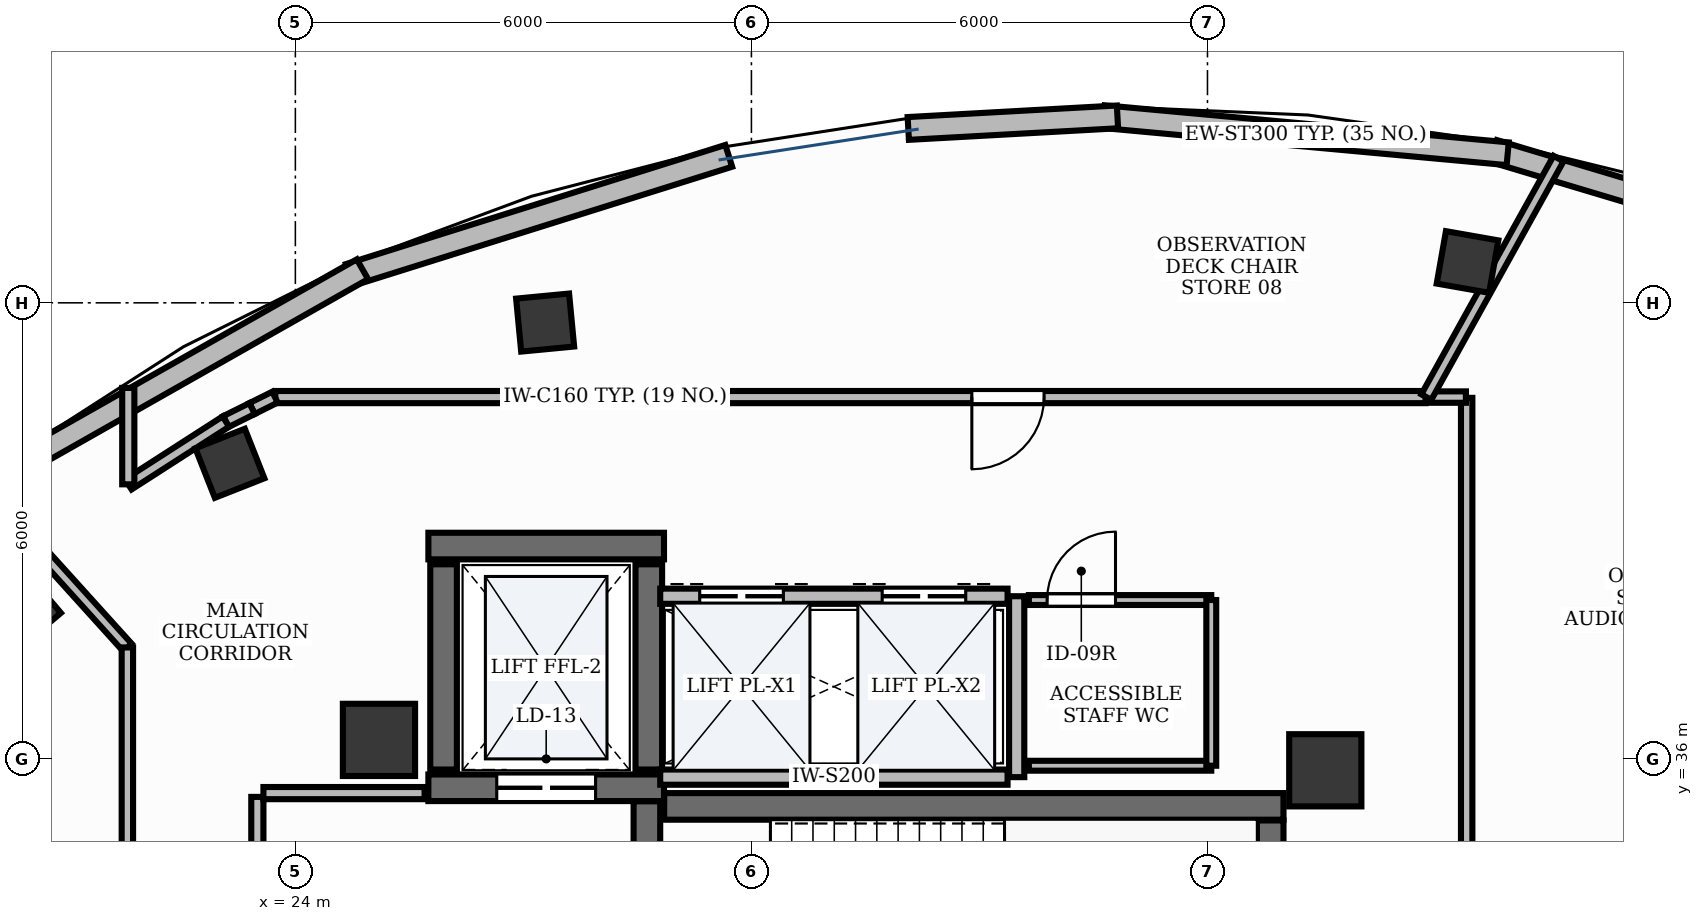
"""IFC4 building model, lengths in metres.
Left out: names, types, materials, properties, quantities, classifications, styles, units other than length and angle.
Written with IfcOpenShell. Run it as: python <this file> out.ifc"""

import sys

from ifc_helpers import new_model, si_unit, direction, frame, frame_2d, origin, origin_2d, place, context, subcontext, project, spatial, rectangle, extrude, element, fill, save


model = new_model("IFC4")
c1 = context("Model", 3, precision=1e-05, world=origin(), true_north=direction((0.0, 1.0)))
c2 = subcontext(c1, "Body", "Model", "MODEL_VIEW")
j1 = project(units=[si_unit("LENGTHUNIT", "METRE"), si_unit("PLANEANGLEUNIT", "RADIAN")], contexts=[c1])
p1 = place(None, origin())
s1 = spatial("IfcSite", under=j1, at=p1, CompositionType="ELEMENT")
p2 = place(p1, origin())
s2 = spatial("IfcBuilding", under=s1, at=p2, CompositionType="ELEMENT")
p3 = place(p2, frame((0.0, 0.0, 318.6)))
s3 = spatial("IfcBuildingStorey", under=s2, at=p3, CompositionType="ELEMENT", Elevation=318.6)
p4 = place(p3, frame((28.852, 35.375, 0.0), z_axis=(0.0, 0.0, 1.0), x_axis=(1.0, 0.0, 0.0)))
e1 = element("IfcWall", 1, at=p4, inside=s3, PredefinedType="SHEAR", context=c2, shape_type="SweptSolid", body=[
    extrude(rectangle(XDim=8.148, YDim=0.35, at=frame_2d((4.074, 0.0))), origin(), (0.0, 0.0, 1.0), 3.79),
])
p5 = place(p3, frame((36.825, 32.11, 0.0), z_axis=(0.0, 0.0, 1.0), x_axis=(0.0, 1.0, 0.0)))
e2 = element("IfcWall", 2, at=p5, inside=s3, PredefinedType="SHEAR", context=c2, shape_type="SweptSolid", body=[
    extrude(rectangle(XDim=3.08, YDim=0.35, at=frame_2d((1.54, 0.0))), origin(), (0.0, 0.0, 1.0), 3.79),
])
p6 = place(p3, frame((28.625, 32.11, 0.0), z_axis=(0.0, 0.0, 1.0), x_axis=(0.0, 1.0, 0.0)))
e3 = element("IfcWall", 3, at=p6, inside=s3, PredefinedType="SHEAR", context=c2, shape_type="SweptSolid", body=[
    extrude(rectangle(XDim=3.333, YDim=0.35, at=frame_2d((1.667, 0.0))), origin(), (0.0, 0.0, 1.0), 3.79),
])
p7 = place(p6, frame((0.2, 0.0, 0.0)))
e4 = element("IfcOpeningElement", 4, at=p7, cuts=e3, PredefinedType="OPENING", context=c2, shape_type="SweptSolid", body=[
    extrude(rectangle(XDim=1.05, YDim=2.15, at=frame_2d((0.525, 1.075))), frame((0.0, 0.19, 0.0), z_axis=(0.0, -1.0, 0.0), x_axis=(1.0, 0.0, 0.0)), (0.0, 0.0, 1.0), 0.38),
])
p8 = place(p3, frame((25.75, 38.8, 0.0), z_axis=(0.0, 0.0, 1.0), x_axis=(1.0, 0.0, 0.0)))
e5 = element("IfcWall", 5, at=p8, inside=s3, PredefinedType="SHEAR", context=c2, shape_type="SweptSolid", body=[
    extrude(rectangle(XDim=3.1, YDim=0.35, at=frame_2d((1.55, 0.0))), origin(), (0.0, 0.0, 1.0), 3.79),
])
p9 = place(p3, frame((25.75, 35.62, 0.0), z_axis=(0.0, 0.0, 1.0), x_axis=(1.0, 0.0, 0.0)))
e6 = element("IfcWall", 6, at=p9, inside=s3, PredefinedType="SHEAR", context=c2, shape_type="SweptSolid", body=[
    extrude(rectangle(XDim=3.1, YDim=0.35, at=frame_2d((1.55, 0.0))), origin(), (0.0, 0.0, 1.0), 3.79),
])
p10 = place(p9, frame((0.9, 0.0, 0.0)))
e7 = element("IfcOpeningElement", 7, at=p10, cuts=e6, PredefinedType="OPENING", context=c2, shape_type="SweptSolid", body=[
    extrude(rectangle(XDim=1.3, YDim=2.2, at=frame_2d((0.65, 1.1))), frame((0.0, 0.19, 0.0), z_axis=(0.0, -1.0, 0.0), x_axis=(1.0, 0.0, 0.0)), (0.0, 0.0, 1.0), 0.38),
])
for number, where, z_axis, x_axis in (
    (8, (25.95, 35.86, 0.0), (0.0, 0.0, 1.0), (0.0, 1.0, 0.0)),
    (9, (28.65, 35.86, 0.0), (0.0, 0.0, 1.0), (0.0, 1.0, 0.0)),
):
    element("IfcWall", number, at=place(p3, frame(where, z_axis=z_axis, x_axis=x_axis)), inside=s3, PredefinedType="SHEAR", context=c2, shape_type="SweptSolid", body=[
        extrude(rectangle(XDim=2.7, YDim=0.35, at=frame_2d((1.35, 0.0))), origin(), (0.0, 0.0, 1.0), 3.79),
    ])
for number, where, z_axis, x_axis in (
    (10, (37.55, 35.85, -0.0), (0.0, 0.0, 1.0), (1.0, 0.0, 0.0)),
    (11, (25.1, 36.25, -0.0), (0.0, 0.0, 1.0), (1.0, 0.0, 0.0)),
):
    element("IfcColumn", number, at=place(p3, frame(where, z_axis=z_axis, x_axis=x_axis)), inside=s3, PredefinedType="PILASTER", context=c2, shape_type="SweptSolid", body=[
        extrude(rectangle(XDim=0.95, YDim=0.95, at=origin_2d()), origin(), (0.0, 0.0, 1.0), 3.791),
    ])
for number, where, z_axis, x_axis in (
    (12, (39.421, 42.537, -0.0), (0.0, 0.0, 1.0), (-0.985, 0.173, 0.0)),
    (13, (27.286, 41.74, -0.0), (0.0, 0.0, 1.0), (0.995, 0.095, 0.0)),
    (14, (23.138, 39.889, -0.0), (0.0, 0.0, 1.0), (0.93, 0.367, 0.0)),
    (15, (20.422, 37.962, -0.0), (0.0, 0.0, 1.0), (0.764, 0.645, 0.0)),
):
    element("IfcColumn", number, at=place(p3, frame(where, z_axis=z_axis, x_axis=x_axis)), inside=s3, PredefinedType="COLUMN", context=c2, shape_type="SweptSolid", body=[
        extrude(rectangle(XDim=0.7, YDim=0.7, at=origin_2d()), origin(), (0.0, 0.0, 1.0), 3.791),
    ])
p11 = place(p3, frame((44.787, 42.493, 0.0), z_axis=(0.0, 0.0, 1.0), x_axis=(-0.957960798093, 0.286899127423, 0.0)))
e16 = element("IfcWall", 16, at=p11, inside=s3, PredefinedType="STANDARD", context=c2, shape_type="SweptSolid", body=[
    extrude(rectangle(XDim=5.241, YDim=0.3, at=frame_2d((2.621, 0.0))), origin(), (0.0, 0.0, 1.0), 3.79),
])
p12 = place(p3, frame((39.95, 43.961, 0.0), z_axis=(0.0, 0.0, 1.0), x_axis=(-0.995809155395, 0.091455595959, 0.0)))
e17 = element("IfcWall", 17, at=p12, inside=s3, PredefinedType="STANDARD", context=c2, shape_type="SweptSolid", body=[
    extrude(rectangle(XDim=5.336, YDim=0.3, at=frame_2d((2.668, 0.0))), origin(), (0.0, 0.0, 1.0), 3.79),
])
p13 = place(p3, frame((34.816, 44.446, 0.0), z_axis=(0.0, 0.0, 1.0), x_axis=(-0.99847639055, -0.055180590022, 0.0)))
e18 = element("IfcWall", 18, at=p13, inside=s3, PredefinedType="STANDARD", context=c2, shape_type="SweptSolid", body=[
    extrude(rectangle(XDim=2.756, YDim=0.3, at=frame_2d((1.378, 0.0))), origin(), (0.0, 0.0, 1.0), 3.79),
])
p14 = place(p3, frame((29.702, 43.934, 0.0), z_axis=(0.0, 0.0, 1.0), x_axis=(-0.954089764454, -0.299520819584, 0.0)))
e19 = element("IfcWall", 19, at=p14, inside=s3, PredefinedType="STANDARD", context=c2, shape_type="SweptSolid", body=[
    extrude(rectangle(XDim=5.232, YDim=0.3, at=frame_2d((2.616, 0.0))), origin(), (0.0, 0.0, 1.0), 3.79),
])
p15 = place(p3, frame((24.883, 42.442, 0.0), z_axis=(0.0, 0.0, 1.0), x_axis=(-0.869895003659, -0.493236943679, 0.0)))
e20 = element("IfcWall", 20, at=p15, inside=s3, PredefinedType="STANDARD", context=c2, shape_type="SweptSolid", body=[
    extrude(rectangle(XDim=5.051, YDim=0.3, at=frame_2d((2.526, 0.0))), origin(), (0.0, 0.0, 1.0), 3.79),
])
p16 = place(p3, frame((33.49, 35.76, 0.0), z_axis=(0.0, 0.0, 1.0), x_axis=(0.0, 1.0, 0.0)))
e21 = element("IfcWall", 21, at=p16, inside=s3, PredefinedType="PARTITIONING", context=c2, shape_type="SweptSolid", body=[
    extrude(rectangle(XDim=2.38, YDim=0.2, at=frame_2d((1.19, 0.0))), origin(), (0.0, 0.0, 1.0), 2.8),
])
p17 = place(p3, frame((28.8, 35.76, 0.0), z_axis=(0.0, 0.0, 1.0), x_axis=(1.0, 0.0, 0.0)))
e22 = element("IfcWall", 22, at=p17, inside=s3, PredefinedType="PARTITIONING", context=c2, shape_type="SweptSolid", body=[
    extrude(rectangle(XDim=4.57, YDim=0.2, at=frame_2d((2.285, 0.0))), origin(), (0.0, 0.0, 1.0), 2.8),
])
p18 = place(p3, frame((28.8, 38.14, 0.0), z_axis=(0.0, 0.0, 1.0), x_axis=(1.0, 0.0, 0.0)))
e23 = element("IfcWall", 23, at=p18, inside=s3, PredefinedType="PARTITIONING", context=c2, shape_type="SweptSolid", body=[
    extrude(rectangle(XDim=4.57, YDim=0.2, at=frame_2d((2.285, 0.0))), origin(), (0.0, 0.0, 1.0), 2.8),
])
p19 = place(p18, frame((0.52, 0.0, 0.0)))
e24 = element("IfcOpeningElement", 24, at=p19, cuts=e23, PredefinedType="OPENING", context=c2, shape_type="SweptSolid", body=[
    extrude(rectangle(XDim=1.1, YDim=2.2, at=frame_2d((0.55, 1.1))), frame((0.0, 0.115, 0.0), z_axis=(0.0, -1.0, 0.0), x_axis=(1.0, 0.0, 0.0)), (0.0, 0.0, 1.0), 0.23),
])
p20 = place(p18, frame((2.92, 0.0, 0.0)))
e25 = element("IfcOpeningElement", 25, at=p20, cuts=e23, PredefinedType="OPENING", context=c2, shape_type="SweptSolid", body=[
    extrude(rectangle(XDim=1.1, YDim=2.2, at=frame_2d((0.55, 1.1))), frame((0.0, 0.115, 0.0), z_axis=(0.0, -1.0, 0.0), x_axis=(1.0, 0.0, 0.0)), (0.0, 0.0, 1.0), 0.23),
])
p21 = place(p3, frame((23.5, 32.1, 0.0), z_axis=(0.0, 0.0, 1.0), x_axis=(0.0, 1.0, 0.0)))
e26 = element("IfcWall", 26, at=p21, inside=s3, PredefinedType="PARTITIONING", context=c2, shape_type="SweptSolid", body=[
    extrude(rectangle(XDim=3.4, YDim=0.16, at=frame_2d((1.7, 0.0))), origin(), (0.0, 0.0, 1.0), 2.8),
])
p22 = place(p21, frame((1.175, 0.0, 0.0)))
e27 = element("IfcOpeningElement", 27, at=p22, cuts=e26, PredefinedType="OPENING", context=c2, shape_type="SweptSolid", body=[
    extrude(rectangle(XDim=1.05, YDim=2.15, at=frame_2d((0.525, 1.075))), frame((0.0, 0.095, 0.0), z_axis=(0.0, -1.0, 0.0), x_axis=(1.0, 0.0, 0.0)), (0.0, 0.0, 1.0), 0.19),
])
p23 = place(p3, frame((23.58, 35.55, 0.0), z_axis=(0.0, 0.0, 1.0), x_axis=(1.0, 0.0, 0.0)))
e28 = element("IfcWall", 28, at=p23, inside=s3, PredefinedType="PARTITIONING", context=c2, shape_type="SweptSolid", body=[
    extrude(rectangle(XDim=2.12, YDim=0.16, at=frame_2d((1.06, 0.0))), origin(), (0.0, 0.0, 1.0), 2.8),
])
p24 = place(p3, frame((33.65, 38.09, 0.0), z_axis=(0.0, 0.0, 1.0), x_axis=(1.0, 0.0, 0.0)))
e29 = element("IfcWall", 29, at=p24, inside=s3, PredefinedType="PARTITIONING", context=c2, shape_type="SweptSolid", body=[
    extrude(rectangle(XDim=2.4, YDim=0.13, at=frame_2d((1.2, 0.0))), origin(), (0.0, 0.0, 1.0), 2.8),
])
p25 = place(p24, frame((0.24, 0.0, 0.0)))
e30 = element("IfcOpeningElement", 30, at=p25, cuts=e29, PredefinedType="OPENING", context=c2, shape_type="SweptSolid", body=[
    extrude(rectangle(XDim=0.9, YDim=2.15, at=frame_2d((0.45, 1.075))), frame((0.0, 0.08, 0.0), z_axis=(0.0, -1.0, 0.0), x_axis=(1.0, 0.0, 0.0)), (0.0, 0.0, 1.0), 0.16),
])
p26 = place(p3, frame((39.41, 30.053, 0.0), z_axis=(0.0, 0.0, 1.0), x_axis=(0.0, 1.0, 0.0)))
e31 = element("IfcWall", 31, at=p26, inside=s3, PredefinedType="PARTITIONING", context=c2, shape_type="SweptSolid", body=[
    extrude(rectangle(XDim=10.697, YDim=0.15, at=frame_2d((5.349, 0.0))), origin(), (0.0, 0.0, 1.0), 2.8),
])
p27 = place(p26, frame((0.571, 0.0, 0.0)))
e32 = element("IfcOpeningElement", 32, at=p27, cuts=e31, PredefinedType="OPENING", context=c2, shape_type="SweptSolid", body=[
    extrude(rectangle(XDim=0.95, YDim=2.15, at=frame_2d((0.475, 1.075))), frame((0.0, 0.09, 0.0), z_axis=(0.0, -1.0, 0.0), x_axis=(1.0, 0.0, 0.0)), (0.0, 0.0, 1.0), 0.18),
])
p28 = place(p3, frame((38.869, 40.76, 0.0), z_axis=(0.0, 0.0, 1.0), x_axis=(-1.0, 0.0, 0.0)))
e33 = element("IfcWall", 33, at=p28, inside=s3, PredefinedType="PARTITIONING", context=c2, shape_type="SweptSolid", body=[
    extrude(rectangle(XDim=15.133, YDim=0.16, at=frame_2d((7.566, 0.0))), origin(), (0.0, 0.0, 1.0), 2.8),
])
p29 = place(p28, frame((5.019, 0.0, 0.0)))
e34 = element("IfcOpeningElement", 34, at=p29, cuts=e33, PredefinedType="OPENING", context=c2, shape_type="SweptSolid", body=[
    extrude(rectangle(XDim=0.95, YDim=2.15, at=frame_2d((0.475, 1.075))), frame((0.0, 0.095, 0.0), z_axis=(0.0, -1.0, 0.0), x_axis=(1.0, 0.0, 0.0)), (0.0, 0.0, 1.0), 0.19),
])
p30 = place(p3, frame((36.05, 35.91, 0.0), z_axis=(0.0, 0.0, 1.0), x_axis=(-1.0, 0.0, 0.0)))
e35 = element("IfcWall", 35, at=p30, inside=s3, PredefinedType="PARTITIONING", context=c2, shape_type="SweptSolid", body=[
    extrude(rectangle(XDim=2.4, YDim=0.13, at=frame_2d((1.2, 0.0))), origin(), (0.0, 0.0, 1.0), 2.8),
])
p31 = place(p3, frame((36.05, 38.09, 0.0), z_axis=(0.0, 0.0, 1.0), x_axis=(0.0, -1.0, 0.0)))
e36 = element("IfcWall", 36, at=p31, inside=s3, PredefinedType="PARTITIONING", context=c2, shape_type="SweptSolid", body=[
    extrude(rectangle(XDim=2.18, YDim=0.13, at=frame_2d((1.09, 0.0))), origin(), (0.0, 0.0, 1.0), 2.8),
])
p32 = place(p3, frame((39.4, 40.76, 0.0), z_axis=(0.0, 0.0, 1.0), x_axis=(-1.0, 0.0, 0.0)))
e37 = element("IfcWall", 37, at=p32, inside=s3, PredefinedType="PARTITIONING", context=c2, shape_type="SweptSolid", body=[
    extrude(rectangle(XDim=0.521, YDim=0.15, at=frame_2d((0.26, 0.0))), origin(), (0.0, 0.0, 1.0), 2.8),
])
p33 = place(p3, frame((38.879, 40.76, 0.0), z_axis=(0.0, 0.0, 1.0), x_axis=(0.484787461139, 0.874631989766, 0.0)))
e38 = element("IfcWall", 38, at=p33, inside=s3, PredefinedType="PARTITIONING", context=c2, shape_type="SweptSolid", body=[
    extrude(rectangle(XDim=3.587, YDim=0.15, at=frame_2d((1.793, 0.0))), origin(), (0.0, 0.0, 1.0), 2.8),
])
p34 = place(p3, frame((23.732, 40.759, 0.0), z_axis=(0.0, 0.0, 1.0), x_axis=(-0.895294719733, -0.445474314431, 0.0)))
e39 = element("IfcWall", 39, at=p34, inside=s3, PredefinedType="PARTITIONING", context=c2, shape_type="SweptSolid", body=[
    extrude(rectangle(XDim=0.337, YDim=0.16, at=frame_2d((0.168, 0.0))), origin(), (0.0, 0.0, 1.0), 2.8),
])
p35 = place(p3, frame((23.43, 40.609, 0.0), z_axis=(0.0, 0.0, 1.0), x_axis=(-0.895442423971, -0.445177341463, 0.0)))
e40 = element("IfcWall", 40, at=p35, inside=s3, PredefinedType="PARTITIONING", context=c2, shape_type="SweptSolid", body=[
    extrude(rectangle(XDim=0.384, YDim=0.16, at=frame_2d((0.192, 0.0))), origin(), (0.0, 0.0, 1.0), 2.8),
])
p36 = place(p3, frame((23.086, 40.438, 0.0), z_axis=(0.0, 0.0, 1.0), x_axis=(-0.841116099264, -0.540854608522, 0.0)))
e41 = element("IfcWall", 41, at=p36, inside=s3, PredefinedType="PARTITIONING", context=c2, shape_type="SweptSolid", body=[
    extrude(rectangle(XDim=1.526, YDim=0.16, at=frame_2d((0.763, 0.0))), origin(), (0.0, 0.0, 1.0), 2.8),
])
p37 = place(p3, frame((21.802, 39.612, 0.0), z_axis=(0.0, 0.0, 1.0), x_axis=(0.0, 1.0, 0.0)))
e42 = element("IfcWall", 42, at=p37, inside=s3, PredefinedType="PARTITIONING", context=c2, shape_type="SweptSolid", body=[
    extrude(rectangle(XDim=1.269, YDim=0.16, at=frame_2d((0.634, 0.0))), origin(), (0.0, 0.0, 1.0), 2.8),
])
p38 = place(p3, frame((19.877, 39.583, 0.0), z_axis=(0.0, 0.0, 1.0), x_axis=(0.670438239368, -0.741965340965, 0.0)))
e43 = element("IfcWall", 43, at=p38, inside=s3, PredefinedType="PARTITIONING", context=c2, shape_type="SweptSolid", body=[
    extrude(rectangle(XDim=2.854, YDim=0.15, at=frame_2d((1.427, 0.0))), origin(), (0.0, 0.0, 1.0), 2.8),
])
p39 = place(p3, frame((21.79, 37.466, 0.0), z_axis=(0.0, 0.0, 1.0), x_axis=(0.0, -1.0, 0.0)))
e44 = element("IfcWall", 44, at=p39, inside=s3, PredefinedType="PARTITIONING", context=c2, shape_type="SweptSolid", body=[
    extrude(rectangle(XDim=2.906, YDim=0.15, at=frame_2d((1.453, 0.0))), origin(), (0.0, 0.0, 1.0), 2.8),
])
p40 = place(p19, origin())
e45 = element("IfcDoor", 45, at=p40, inside=s3, OperationType="DOUBLE_DOOR_SLIDING", PredefinedType="DOOR", context=c2, shape_type="SweptSolid", body=[
    extrude(rectangle(XDim=1.1, YDim=2.2, at=frame_2d((0.55, 1.1))), frame((0.0, 0.025, 0.0), z_axis=(0.0, -1.0, 0.0), x_axis=(1.0, 0.0, 0.0)), (0.0, 0.0, 1.0), 0.05),
])
fill(e24, e45)
p41 = place(p20, origin())
e46 = element("IfcDoor", 46, at=p41, inside=s3, OperationType="DOUBLE_DOOR_SLIDING", PredefinedType="DOOR", context=c2, shape_type="SweptSolid", body=[
    extrude(rectangle(XDim=1.1, YDim=2.2, at=frame_2d((0.55, 1.1))), frame((0.0, 0.025, 0.0), z_axis=(0.0, -1.0, 0.0), x_axis=(1.0, 0.0, 0.0)), (0.0, 0.0, 1.0), 0.05),
])
fill(e25, e46)
p42 = place(p10, origin())
e47 = element("IfcDoor", 47, at=p42, inside=s3, OperationType="DOUBLE_DOOR_SLIDING", PredefinedType="DOOR", context=c2, shape_type="SweptSolid", body=[
    extrude(rectangle(XDim=1.3, YDim=2.2, at=frame_2d((0.65, 1.1))), frame((0.0, 0.025, 0.0), z_axis=(0.0, -1.0, 0.0), x_axis=(1.0, 0.0, 0.0)), (0.0, 0.0, 1.0), 0.05),
])
fill(e7, e47)
p43 = place(p25, origin())
e48 = element("IfcDoor", 48, at=p43, inside=s3, OperationType="SINGLE_SWING_RIGHT", PredefinedType="DOOR", context=c2, shape_type="SweptSolid", body=[
    extrude(rectangle(XDim=0.9, YDim=2.15, at=frame_2d((0.45, 1.075))), frame((0.0, 0.025, 0.0), z_axis=(0.0, -1.0, 0.0), x_axis=(1.0, 0.0, 0.0)), (0.0, 0.0, 1.0), 0.05),
])
fill(e30, e48)
p44 = place(p29, origin())
e49 = element("IfcDoor", 49, at=p44, inside=s3, OperationType="SINGLE_SWING_RIGHT", PredefinedType="DOOR", context=c2, shape_type="SweptSolid", body=[
    extrude(rectangle(XDim=0.95, YDim=2.15, at=frame_2d((0.475, 1.075))), frame((0.0, 0.025, 0.0), z_axis=(0.0, -1.0, 0.0), x_axis=(1.0, 0.0, 0.0)), (0.0, 0.0, 1.0), 0.05),
])
fill(e34, e49)
save(model, sys.argv[1])
